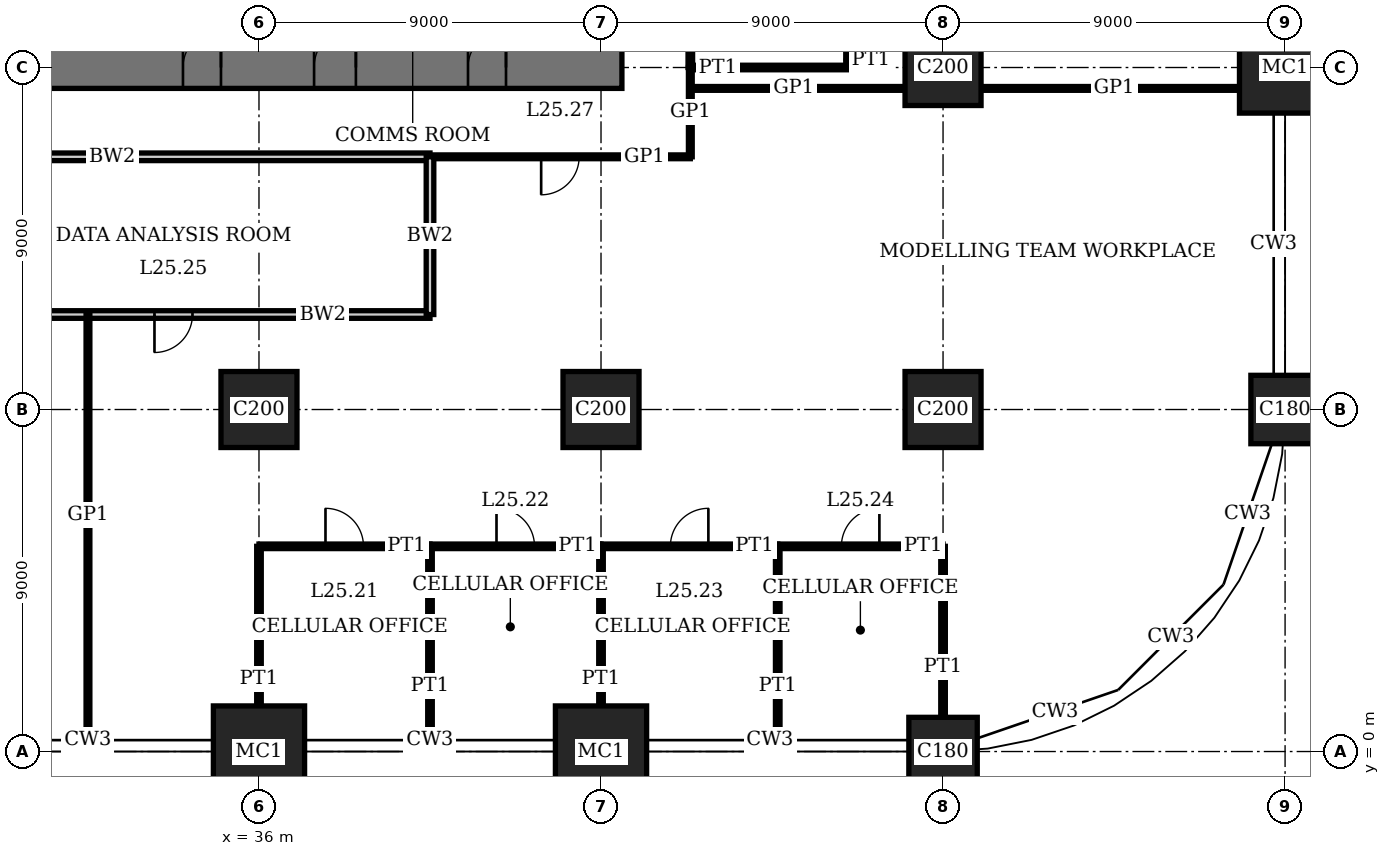
"""IFC4 building model, lengths in metres.
Left out: names, types, materials, properties, quantities, classifications, styles, units other than length and angle.
Written with IfcOpenShell. Run it as: python <this file> out.ifc"""

import sys

from ifc_helpers import new_model, si_unit, direction, frame, frame_2d, origin, origin_2d, place, context, subcontext, project, spatial, rectangle, extrude, element, fill, save


model = new_model("IFC4")
c1 = context("Model", 3, precision=1e-05, world=origin(), true_north=direction((0.0, 1.0)))
c2 = subcontext(c1, "Body", "Model", "MODEL_VIEW")
j1 = project(units=[si_unit("LENGTHUNIT", "METRE"), si_unit("PLANEANGLEUNIT", "RADIAN")], contexts=[c1])
p1 = place(None, origin())
s1 = spatial("IfcSite", under=j1, at=p1, CompositionType="ELEMENT")
p2 = place(p1, origin())
s2 = spatial("IfcBuilding", under=s1, at=p2, CompositionType="ELEMENT")
p3 = place(p2, frame((0.0, 0.0, 105.0)))
s3 = spatial("IfcBuildingStorey", under=s2, at=p3, CompositionType="ELEMENT", Elevation=105.0)
p4 = place(p3, frame((36.0, 0.0, 0.0), z_axis=(0.0, 0.0, 1.0), x_axis=(1.0, 0.0, 0.0)))
e1 = element("IfcColumn", 1, at=p4, inside=s3, PredefinedType="COLUMN", context=c2, shape_type="SweptSolid", body=[
    extrude(rectangle(XDim=2.4, YDim=2.4, at=origin_2d()), origin(), (0.0, 0.0, 1.0), 4.0),
])
p5 = place(p3, frame((36.0, 9.0, 0.0), z_axis=(0.0, 0.0, 1.0), x_axis=(1.0, 0.0, 0.0)))
e2 = element("IfcColumn", 2, at=p5, inside=s3, PredefinedType="COLUMN", context=c2, shape_type="SweptSolid", body=[
    extrude(rectangle(XDim=2.0, YDim=2.0, at=origin_2d()), origin(), (0.0, 0.0, 1.0), 4.0),
])
p6 = place(p3, frame((45.0, 0.0, 0.0), z_axis=(0.0, 0.0, 1.0), x_axis=(1.0, 0.0, 0.0)))
e3 = element("IfcColumn", 3, at=p6, inside=s3, PredefinedType="COLUMN", context=c2, shape_type="SweptSolid", body=[
    extrude(rectangle(XDim=2.4, YDim=2.4, at=origin_2d()), origin(), (0.0, 0.0, 1.0), 4.0),
])
p7 = place(p3, frame((45.0, 9.0, 0.0), z_axis=(0.0, 0.0, 1.0), x_axis=(1.0, 0.0, 0.0)))
e4 = element("IfcColumn", 4, at=p7, inside=s3, PredefinedType="COLUMN", context=c2, shape_type="SweptSolid", body=[
    extrude(rectangle(XDim=2.0, YDim=2.0, at=origin_2d()), origin(), (0.0, 0.0, 1.0), 4.0),
])
p8 = place(p3, frame((54.0, 0.0, 0.0), z_axis=(0.0, 0.0, 1.0), x_axis=(1.0, 0.0, 0.0)))
e5 = element("IfcColumn", 5, at=p8, inside=s3, PredefinedType="COLUMN", context=c2, shape_type="SweptSolid", body=[
    extrude(rectangle(XDim=1.8, YDim=1.8, at=origin_2d()), origin(), (0.0, 0.0, 1.0), 4.0),
])
for number, where, z_axis, x_axis in (
    (6, (54.0, 9.0, 0.0), (0.0, 0.0, 1.0), (1.0, 0.0, 0.0)),
    (7, (54.0, 18.0, 0.0), (0.0, 0.0, 1.0), (1.0, 0.0, 0.0)),
):
    element("IfcColumn", number, at=place(p3, frame(where, z_axis=z_axis, x_axis=x_axis)), inside=s3, PredefinedType="COLUMN", context=c2, shape_type="SweptSolid", body=[
        extrude(rectangle(XDim=2.0, YDim=2.0, at=origin_2d()), origin(), (0.0, 0.0, 1.0), 4.0),
    ])
p9 = place(p3, frame((63.0, 9.0, 0.0), z_axis=(0.0, 0.0, 1.0), x_axis=(1.0, 0.0, 0.0)))
e8 = element("IfcColumn", 8, at=p9, inside=s3, PredefinedType="COLUMN", context=c2, shape_type="SweptSolid", body=[
    extrude(rectangle(XDim=1.8, YDim=1.8, at=origin_2d()), origin(), (0.0, 0.0, 1.0), 4.0),
])
p10 = place(p3, frame((63.0, 18.0, 0.0), z_axis=(0.0, 0.0, 1.0), x_axis=(1.0, 0.0, 0.0)))
e9 = element("IfcColumn", 9, at=p10, inside=s3, PredefinedType="COLUMN", context=c2, shape_type="SweptSolid", body=[
    extrude(rectangle(XDim=2.4, YDim=2.4, at=origin_2d()), origin(), (0.0, 0.0, 1.0), 4.0),
])
p11 = place(p3, frame((17.45, 18.0, 0.0), z_axis=(0.0, 0.0, 1.0), x_axis=(1.0, 0.0, 0.0)))
e10 = element("IfcWall", 10, at=p11, inside=s3, PredefinedType="SHEAR", context=c2, shape_type="SweptSolid", body=[
    extrude(rectangle(XDim=28.1, YDim=1.1, at=frame_2d((14.05, 0.0))), origin(), (0.0, 0.0, 1.0), 4.0),
])
p12 = place(p11, frame((11.55, 0.0, 0.0)))
e11 = element("IfcOpeningElement", 11, at=p12, cuts=e10, PredefinedType="OPENING", context=c2, shape_type="SweptSolid", body=[
    extrude(rectangle(XDim=1.0, YDim=2.4, at=frame_2d((0.5, 1.2))), frame((0.0, 0.56, 0.0), z_axis=(0.0, -1.0, 0.0), x_axis=(1.0, 0.0, 0.0)), (0.0, 0.0, 1.0), 1.12),
])
p13 = place(p11, frame((16.55, 0.0, 0.0)))
e12 = element("IfcOpeningElement", 12, at=p13, cuts=e10, PredefinedType="OPENING", context=c2, shape_type="SweptSolid", body=[
    extrude(rectangle(XDim=1.0, YDim=2.4, at=frame_2d((0.5, 1.2))), frame((0.0, 0.56, 0.0), z_axis=(0.0, -1.0, 0.0), x_axis=(1.0, 0.0, 0.0)), (0.0, 0.0, 1.0), 1.12),
])
p14 = place(p11, frame((20.0, 0.0, 0.0)))
e13 = element("IfcOpeningElement", 13, at=p14, cuts=e10, PredefinedType="OPENING", context=c2, shape_type="SweptSolid", body=[
    extrude(rectangle(XDim=1.1, YDim=2.4, at=frame_2d((0.55, 1.2))), frame((0.0, 0.56, 0.0), z_axis=(0.0, -1.0, 0.0), x_axis=(1.0, 0.0, 0.0)), (0.0, 0.0, 1.0), 1.12),
])
p15 = place(p11, frame((24.05, 0.0, 0.0)))
e14 = element("IfcOpeningElement", 14, at=p15, cuts=e10, PredefinedType="OPENING", context=c2, shape_type="SweptSolid", body=[
    extrude(rectangle(XDim=1.0, YDim=2.4, at=frame_2d((0.5, 1.2))), frame((0.0, 0.56, 0.0), z_axis=(0.0, -1.0, 0.0), x_axis=(1.0, 0.0, 0.0)), (0.0, 0.0, 1.0), 1.12),
])
p16 = place(p3, frame((36.0, 5.4, 0.0), z_axis=(0.0, 0.0, 1.0), x_axis=(1.0, 0.0, 0.0)))
e15 = element("IfcWall", 15, at=p16, inside=s3, PredefinedType="PARTITIONING", context=c2, shape_type="SweptSolid", body=[
    extrude(rectangle(XDim=4.5, YDim=0.12, at=frame_2d((2.25, 0.0))), origin(), (0.0, 0.0, 1.0), 3.75),
])
p17 = place(p16, frame((1.75, 0.0, 0.0)))
e16 = element("IfcOpeningElement", 16, at=p17, cuts=e15, PredefinedType="OPENING", context=c2, shape_type="SweptSolid", body=[
    extrude(rectangle(XDim=1.0, YDim=2.4, at=frame_2d((0.5, 1.2))), frame((0.0, 0.07, 0.0), z_axis=(0.0, -1.0, 0.0), x_axis=(1.0, 0.0, 0.0)), (0.0, 0.0, 1.0), 0.14),
])
p18 = place(p3, frame((40.5, 5.4, 0.0), z_axis=(0.0, 0.0, 1.0), x_axis=(1.0, 0.0, 0.0)))
e17 = element("IfcWall", 17, at=p18, inside=s3, PredefinedType="PARTITIONING", context=c2, shape_type="SweptSolid", body=[
    extrude(rectangle(XDim=4.5, YDim=0.12, at=frame_2d((2.25, 0.0))), origin(), (0.0, 0.0, 1.0), 3.75),
])
p19 = place(p18, frame((1.75, 0.0, 0.0)))
e18 = element("IfcOpeningElement", 18, at=p19, cuts=e17, PredefinedType="OPENING", context=c2, shape_type="SweptSolid", body=[
    extrude(rectangle(XDim=1.0, YDim=2.4, at=frame_2d((0.5, 1.2))), frame((0.0, 0.07, 0.0), z_axis=(0.0, -1.0, 0.0), x_axis=(1.0, 0.0, 0.0)), (0.0, 0.0, 1.0), 0.14),
])
p20 = place(p3, frame((45.0, 5.4, 0.0), z_axis=(0.0, 0.0, 1.0), x_axis=(1.0, 0.0, 0.0)))
e19 = element("IfcWall", 19, at=p20, inside=s3, PredefinedType="PARTITIONING", context=c2, shape_type="SweptSolid", body=[
    extrude(rectangle(XDim=4.65, YDim=0.12, at=frame_2d((2.325, 0.0))), origin(), (0.0, 0.0, 1.0), 3.75),
])
p21 = place(p20, frame((1.825, 0.0, 0.0)))
e20 = element("IfcOpeningElement", 20, at=p21, cuts=e19, PredefinedType="OPENING", context=c2, shape_type="SweptSolid", body=[
    extrude(rectangle(XDim=1.0, YDim=2.4, at=frame_2d((0.5, 1.2))), frame((0.0, 0.07, 0.0), z_axis=(0.0, -1.0, 0.0), x_axis=(1.0, 0.0, 0.0)), (0.0, 0.0, 1.0), 0.14),
])
p22 = place(p3, frame((49.65, 5.4, 0.0), z_axis=(0.0, 0.0, 1.0), x_axis=(1.0, 0.0, 0.0)))
e21 = element("IfcWall", 21, at=p22, inside=s3, PredefinedType="PARTITIONING", context=c2, shape_type="SweptSolid", body=[
    extrude(rectangle(XDim=4.35, YDim=0.12, at=frame_2d((2.175, 0.0))), origin(), (0.0, 0.0, 1.0), 3.75),
])
p23 = place(p22, frame((1.675, 0.0, 0.0)))
e22 = element("IfcOpeningElement", 22, at=p23, cuts=e21, PredefinedType="OPENING", context=c2, shape_type="SweptSolid", body=[
    extrude(rectangle(XDim=1.0, YDim=2.4, at=frame_2d((0.5, 1.2))), frame((0.0, 0.07, 0.0), z_axis=(0.0, -1.0, 0.0), x_axis=(1.0, 0.0, 0.0)), (0.0, 0.0, 1.0), 0.14),
])
p24 = place(p3, frame((27.0, 11.5, 0.0), z_axis=(0.0, 0.0, 1.0), x_axis=(1.0, 0.0, 0.0)))
e23 = element("IfcWall", 23, at=p24, inside=s3, PredefinedType="SOLIDWALL", context=c2, shape_type="SweptSolid", body=[
    extrude(rectangle(XDim=13.5, YDim=0.2, at=frame_2d((6.75, 0.0))), origin(), (0.0, 0.0, 1.0), 3.75),
])
p25 = place(p24, frame((6.25, 0.0, 0.0)))
e24 = element("IfcOpeningElement", 24, at=p25, cuts=e23, PredefinedType="OPENING", context=c2, shape_type="SweptSolid", body=[
    extrude(rectangle(XDim=1.0, YDim=2.4, at=frame_2d((0.5, 1.2))), frame((0.0, 0.11, 0.0), z_axis=(0.0, -1.0, 0.0), x_axis=(1.0, 0.0, 0.0)), (0.0, 0.0, 1.0), 0.22),
])
p26 = place(p3, frame((27.0, 15.65, 0.0), z_axis=(0.0, 0.0, 1.0), x_axis=(1.0, 0.0, 0.0)))
e25 = element("IfcWall", 25, at=p26, inside=s3, PredefinedType="SOLIDWALL", context=c2, shape_type="SweptSolid", body=[
    extrude(rectangle(XDim=13.5, YDim=0.2, at=frame_2d((6.75, 0.0))), origin(), (0.0, 0.0, 1.0), 3.75),
])
p27 = place(p3, frame((40.5, 15.65, 0.0), z_axis=(0.0, 0.0, 1.0), x_axis=(1.0, 0.0, 0.0)))
e26 = element("IfcWall", 26, at=p27, inside=s3, PredefinedType="PARTITIONING", context=c2, shape_type="SweptSolid", body=[
    extrude(rectangle(XDim=6.85, YDim=0.1, at=frame_2d((3.425, 0.0))), origin(), (0.0, 0.0, 1.0), 3.75),
])
p28 = place(p27, frame((2.925, 0.0, 0.0)))
e27 = element("IfcOpeningElement", 27, at=p28, cuts=e26, PredefinedType="OPENING", context=c2, shape_type="SweptSolid", body=[
    extrude(rectangle(XDim=1.0, YDim=2.4, at=frame_2d((0.5, 1.2))), frame((0.0, 0.06, 0.0), z_axis=(0.0, -1.0, 0.0), x_axis=(1.0, 0.0, 0.0)), (0.0, 0.0, 1.0), 0.12),
])
p29 = place(p3, frame((47.35, 17.45, 0.0), z_axis=(0.0, 0.0, 1.0), x_axis=(1.0, 0.0, 0.0)))
e28 = element("IfcWall", 28, at=p29, inside=s3, PredefinedType="PARTITIONING", context=c2, shape_type="SweptSolid", body=[
    extrude(rectangle(XDim=5.65, YDim=0.1, at=frame_2d((2.825, 0.0))), origin(), (0.0, 0.0, 1.0), 3.75),
])
p30 = place(p3, frame((55.0, 17.45, 0.0), z_axis=(0.0, 0.0, 1.0), x_axis=(1.0, 0.0, 0.0)))
e29 = element("IfcWall", 29, at=p30, inside=s3, PredefinedType="PARTITIONING", context=c2, shape_type="SweptSolid", body=[
    extrude(rectangle(XDim=6.8, YDim=0.1, at=frame_2d((3.4, 0.0))), origin(), (0.0, 0.0, 1.0), 3.75),
])
p31 = place(p3, frame((47.35, 18.0, 0.0), z_axis=(0.0, 0.0, 1.0), x_axis=(1.0, 0.0, 0.0)))
e30 = element("IfcWall", 30, at=p31, inside=s3, PredefinedType="PARTITIONING", context=c2, shape_type="SweptSolid", body=[
    extrude(rectangle(XDim=4.15, YDim=0.12, at=frame_2d((2.075, 0.0))), origin(), (0.0, 0.0, 1.0), 3.05),
])
p32 = place(p3, frame((31.5, 0.31, 0.0), z_axis=(0.0, 0.0, 1.0), x_axis=(0.0, 1.0, 0.0)))
e31 = element("IfcWall", 31, at=p32, inside=s3, PredefinedType="PARTITIONING", context=c2, shape_type="SweptSolid", body=[
    extrude(rectangle(XDim=11.2, YDim=0.1, at=frame_2d((5.6, 0.0))), origin(), (0.0, 0.0, 1.0), 3.75),
])
p33 = place(p3, frame((36.0, 1.2, 0.0), z_axis=(0.0, 0.0, 1.0), x_axis=(0.0, 1.0, 0.0)))
e32 = element("IfcWall", 32, at=p33, inside=s3, PredefinedType="PARTITIONING", context=c2, shape_type="SweptSolid", body=[
    extrude(rectangle(XDim=4.2, YDim=0.12, at=frame_2d((2.1, 0.0))), origin(), (0.0, 0.0, 1.0), 3.05),
])
p34 = place(p3, frame((40.5, 11.5, 0.0), z_axis=(0.0, 0.0, 1.0), x_axis=(0.0, 1.0, 0.0)))
e33 = element("IfcWall", 33, at=p34, inside=s3, PredefinedType="SOLIDWALL", context=c2, shape_type="SweptSolid", body=[
    extrude(rectangle(XDim=4.15, YDim=0.2, at=frame_2d((2.075, 0.0))), origin(), (0.0, 0.0, 1.0), 3.75),
])
p35 = place(p3, frame((40.5, 0.31, 0.0), z_axis=(0.0, 0.0, 1.0), x_axis=(0.0, 1.0, 0.0)))
e34 = element("IfcWall", 34, at=p35, inside=s3, PredefinedType="PARTITIONING", context=c2, shape_type="SweptSolid", body=[
    extrude(rectangle(XDim=5.09, YDim=0.12, at=frame_2d((2.545, 0.0))), origin(), (0.0, 0.0, 1.0), 3.75),
])
p36 = place(p3, frame((45.0, 1.2, 0.0), z_axis=(0.0, 0.0, 1.0), x_axis=(0.0, 1.0, 0.0)))
e35 = element("IfcWall", 35, at=p36, inside=s3, PredefinedType="PARTITIONING", context=c2, shape_type="SweptSolid", body=[
    extrude(rectangle(XDim=4.2, YDim=0.12, at=frame_2d((2.1, 0.0))), origin(), (0.0, 0.0, 1.0), 3.05),
])
p37 = place(p3, frame((47.35, 18.0, 0.0), z_axis=(0.0, 0.0, 1.0), x_axis=(0.0, 1.0, 0.0)))
e36 = element("IfcWall", 36, at=p37, inside=s3, PredefinedType="PARTITIONING", context=c2, shape_type="SweptSolid", body=[
    extrude(rectangle(XDim=4.5, YDim=0.12, at=frame_2d((2.25, 0.0))), origin(), (0.0, 0.0, 1.0), 3.75),
])
p38 = place(p3, frame((47.35, 15.65, 0.0), z_axis=(0.0, 0.0, 1.0), x_axis=(0.0, 1.0, 0.0)))
e37 = element("IfcWall", 37, at=p38, inside=s3, PredefinedType="PARTITIONING", context=c2, shape_type="SweptSolid", body=[
    extrude(rectangle(XDim=2.35, YDim=0.1, at=frame_2d((1.175, 0.0))), origin(), (0.0, 0.0, 1.0), 3.75),
])
p39 = place(p3, frame((49.65, 0.31, 0.0), z_axis=(0.0, 0.0, 1.0), x_axis=(0.0, 1.0, 0.0)))
e38 = element("IfcWall", 38, at=p39, inside=s3, PredefinedType="PARTITIONING", context=c2, shape_type="SweptSolid", body=[
    extrude(rectangle(XDim=5.09, YDim=0.12, at=frame_2d((2.545, 0.0))), origin(), (0.0, 0.0, 1.0), 3.75),
])
p40 = place(p3, frame((51.5, 18.0, 0.0), z_axis=(0.0, 0.0, 1.0), x_axis=(0.0, 1.0, 0.0)))
e39 = element("IfcWall", 39, at=p40, inside=s3, PredefinedType="PARTITIONING", context=c2, shape_type="SweptSolid", body=[
    extrude(rectangle(XDim=4.5, YDim=0.12, at=frame_2d((2.25, 0.0))), origin(), (0.0, 0.0, 1.0), 3.75),
])
p41 = place(p40, frame((1.75, 0.0, 0.0)))
e40 = element("IfcOpeningElement", 40, at=p41, cuts=e39, PredefinedType="OPENING", context=c2, shape_type="SweptSolid", body=[
    extrude(rectangle(XDim=1.0, YDim=2.4, at=frame_2d((0.5, 1.2))), frame((0.0, 0.07, 0.0), z_axis=(0.0, -1.0, 0.0), x_axis=(1.0, 0.0, 0.0)), (0.0, 0.0, 1.0), 0.14),
])
p42 = place(p3, frame((54.0, 0.9, 0.0), z_axis=(0.0, 0.0, 1.0), x_axis=(0.0, 1.0, 0.0)))
e41 = element("IfcWall", 41, at=p42, inside=s3, PredefinedType="PARTITIONING", context=c2, shape_type="SweptSolid", body=[
    extrude(rectangle(XDim=4.5, YDim=0.12, at=frame_2d((2.25, 0.0))), origin(), (0.0, 0.0, 1.0), 3.05),
])
p43 = place(p13, origin())
e42 = element("IfcDoor", 42, at=p43, inside=s3, OperationType="SINGLE_SWING_LEFT", PredefinedType="DOOR", context=c2, shape_type="SweptSolid", body=[
    extrude(rectangle(XDim=1.0, YDim=2.4, at=frame_2d((0.5, 1.2))), frame((0.0, 0.025, 0.0), z_axis=(0.0, -1.0, 0.0), x_axis=(1.0, 0.0, 0.0)), (0.0, 0.0, 1.0), 0.05),
    extrude(rectangle(XDim=0.04, YDim=2.4, at=frame_2d((0.02, 1.2))), frame((0.0, 0.4, 0.0), z_axis=(0.0, -1.0, 0.0), x_axis=(1.0, 0.0, 0.0)), (0.0, 0.0, 1.0), 0.8),
    extrude(rectangle(XDim=0.04, YDim=2.4, at=frame_2d((0.98, 1.2))), frame((0.0, 0.4, 0.0), z_axis=(0.0, -1.0, 0.0), x_axis=(1.0, 0.0, 0.0)), (0.0, 0.0, 1.0), 0.8),
    extrude(rectangle(XDim=1.0, YDim=0.04, at=frame_2d((0.5, 2.38))), frame((0.0, 0.4, 0.0), z_axis=(0.0, -1.0, 0.0), x_axis=(1.0, 0.0, 0.0)), (0.0, 0.0, 1.0), 0.8),
])
fill(e12, e42)
p44 = place(p14, origin())
e43 = element("IfcDoor", 43, at=p44, inside=s3, OperationType="SINGLE_SWING_LEFT", PredefinedType="DOOR", context=c2, shape_type="SweptSolid", body=[
    extrude(rectangle(XDim=1.1, YDim=2.4, at=frame_2d((0.55, 1.2))), frame((0.0, 0.025, 0.0), z_axis=(0.0, -1.0, 0.0), x_axis=(1.0, 0.0, 0.0)), (0.0, 0.0, 1.0), 0.05),
    extrude(rectangle(XDim=0.04, YDim=2.4, at=frame_2d((0.02, 1.2))), frame((0.0, 0.44, 0.0), z_axis=(0.0, -1.0, 0.0), x_axis=(1.0, 0.0, 0.0)), (0.0, 0.0, 1.0), 0.88),
    extrude(rectangle(XDim=0.04, YDim=2.4, at=frame_2d((1.08, 1.2))), frame((0.0, 0.44, 0.0), z_axis=(0.0, -1.0, 0.0), x_axis=(1.0, 0.0, 0.0)), (0.0, 0.0, 1.0), 0.88),
    extrude(rectangle(XDim=1.1, YDim=0.04, at=frame_2d((0.55, 2.38))), frame((0.0, 0.44, 0.0), z_axis=(0.0, -1.0, 0.0), x_axis=(1.0, 0.0, 0.0)), (0.0, 0.0, 1.0), 0.88),
])
fill(e13, e43)
p45 = place(p15, origin())
e44 = element("IfcDoor", 44, at=p45, inside=s3, OperationType="SINGLE_SWING_LEFT", PredefinedType="DOOR", context=c2, shape_type="SweptSolid", body=[
    extrude(rectangle(XDim=1.0, YDim=2.4, at=frame_2d((0.5, 1.2))), frame((0.0, 0.025, 0.0), z_axis=(0.0, -1.0, 0.0), x_axis=(1.0, 0.0, 0.0)), (0.0, 0.0, 1.0), 0.05),
    extrude(rectangle(XDim=0.04, YDim=2.4, at=frame_2d((0.02, 1.2))), frame((0.0, 0.4, 0.0), z_axis=(0.0, -1.0, 0.0), x_axis=(1.0, 0.0, 0.0)), (0.0, 0.0, 1.0), 0.8),
    extrude(rectangle(XDim=0.04, YDim=2.4, at=frame_2d((0.98, 1.2))), frame((0.0, 0.4, 0.0), z_axis=(0.0, -1.0, 0.0), x_axis=(1.0, 0.0, 0.0)), (0.0, 0.0, 1.0), 0.8),
    extrude(rectangle(XDim=1.0, YDim=0.04, at=frame_2d((0.5, 2.38))), frame((0.0, 0.4, 0.0), z_axis=(0.0, -1.0, 0.0), x_axis=(1.0, 0.0, 0.0)), (0.0, 0.0, 1.0), 0.8),
])
fill(e14, e44)
p46 = place(p17, origin())
e45 = element("IfcDoor", 45, at=p46, inside=s3, OperationType="SINGLE_SWING_RIGHT", PredefinedType="DOOR", context=c2, shape_type="SweptSolid", body=[
    extrude(rectangle(XDim=1.0, YDim=2.4, at=frame_2d((0.5, 1.2))), frame((0.0, 0.025, 0.0), z_axis=(0.0, -1.0, 0.0), x_axis=(1.0, 0.0, 0.0)), (0.0, 0.0, 1.0), 0.05),
])
fill(e16, e45)
p47 = place(p19, origin())
e46 = element("IfcDoor", 46, at=p47, inside=s3, OperationType="SINGLE_SWING_RIGHT", PredefinedType="DOOR", context=c2, shape_type="SweptSolid", body=[
    extrude(rectangle(XDim=1.0, YDim=2.4, at=frame_2d((0.5, 1.2))), frame((0.0, 0.025, 0.0), z_axis=(0.0, -1.0, 0.0), x_axis=(1.0, 0.0, 0.0)), (0.0, 0.0, 1.0), 0.05),
])
fill(e18, e46)
p48 = place(p21, origin())
e47 = element("IfcDoor", 47, at=p48, inside=s3, OperationType="SINGLE_SWING_LEFT", PredefinedType="DOOR", context=c2, shape_type="SweptSolid", body=[
    extrude(rectangle(XDim=1.0, YDim=2.4, at=frame_2d((0.5, 1.2))), frame((0.0, 0.025, 0.0), z_axis=(0.0, -1.0, 0.0), x_axis=(1.0, 0.0, 0.0)), (0.0, 0.0, 1.0), 0.05),
])
fill(e20, e47)
p49 = place(p23, origin())
e48 = element("IfcDoor", 48, at=p49, inside=s3, OperationType="SINGLE_SWING_LEFT", PredefinedType="DOOR", context=c2, shape_type="SweptSolid", body=[
    extrude(rectangle(XDim=1.0, YDim=2.4, at=frame_2d((0.5, 1.2))), frame((0.0, 0.025, 0.0), z_axis=(0.0, -1.0, 0.0), x_axis=(1.0, 0.0, 0.0)), (0.0, 0.0, 1.0), 0.05),
])
fill(e22, e48)
p50 = place(p25, origin())
e49 = element("IfcDoor", 49, at=p50, inside=s3, OperationType="SINGLE_SWING_LEFT", PredefinedType="DOOR", context=c2, shape_type="SweptSolid", body=[
    extrude(rectangle(XDim=1.0, YDim=2.4, at=frame_2d((0.5, 1.2))), frame((0.0, 0.035, 0.0), z_axis=(0.0, -1.0, 0.0), x_axis=(1.0, 0.0, 0.0)), (0.0, 0.0, 1.0), 0.07),
])
fill(e24, e49)
p51 = place(p28, origin())
e50 = element("IfcDoor", 50, at=p51, inside=s3, OperationType="SINGLE_SWING_LEFT", PredefinedType="DOOR", context=c2, shape_type="SweptSolid", body=[
    extrude(rectangle(XDim=1.0, YDim=2.4, at=frame_2d((0.5, 1.2))), frame((0.0, 0.02, 0.0), z_axis=(0.0, -1.0, 0.0), x_axis=(1.0, 0.0, 0.0)), (0.0, 0.0, 1.0), 0.04),
])
fill(e27, e50)
save(model, sys.argv[1])
